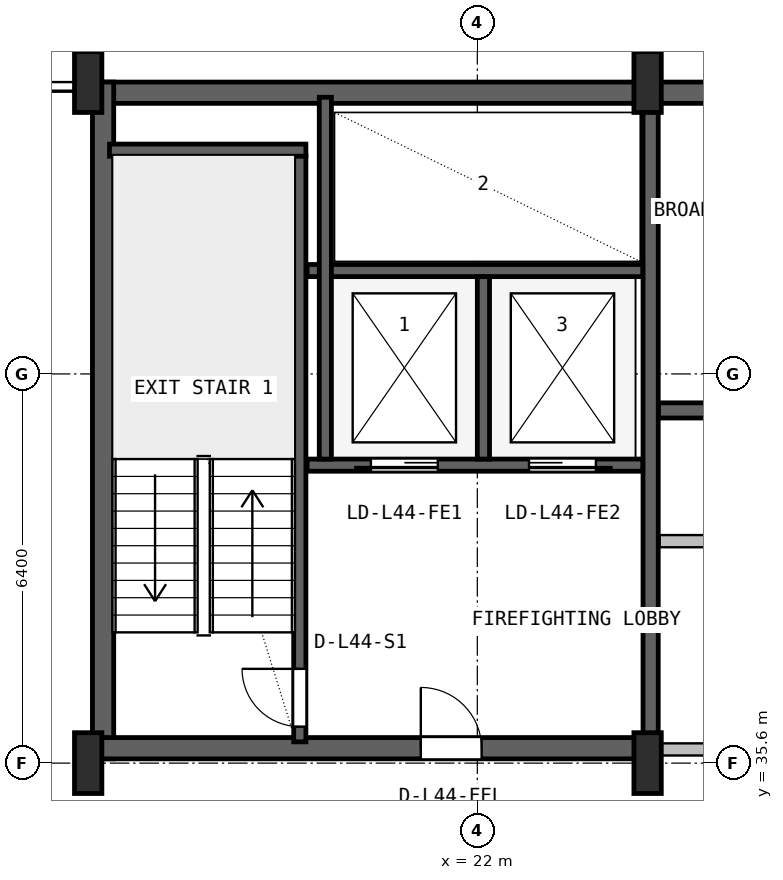
"""IFC4 building model, lengths in metres.
Left out: names, types, materials, properties, quantities, classifications, styles, units other than length and angle.
Written with IfcOpenShell. Run it as: python <this file> out.ifc"""

import sys

from ifc_helpers import new_model, si_unit, direction, frame, frame_2d, origin, origin_2d, place, context, subcontext, project, spatial, rectangle, i_section, extrude, source, transform, mapped, element, fill, save


model = new_model("IFC4")
c1 = context("Model", 3, precision=1e-05, world=origin(), true_north=direction((0.0, 1.0)))
c2 = subcontext(c1, "Body", "Model", "MODEL_VIEW")
j1 = project(units=[si_unit("LENGTHUNIT", "METRE"), si_unit("PLANEANGLEUNIT", "RADIAN")], contexts=[c1])
p1 = place(None, origin())
s1 = spatial("IfcSite", under=j1, at=p1, CompositionType="ELEMENT")
p2 = place(p1, origin())
s2 = spatial("IfcBuilding", under=s1, at=p2, CompositionType="ELEMENT")
p3 = place(p2, frame((0.0, 0.0, 180.0)))
s3 = spatial("IfcBuildingStorey", under=s2, at=p3, CompositionType="ELEMENT", Elevation=180.0)
p4 = place(p3, frame((15.6, 46.625, 0.0), z_axis=(0.0, 0.0, 1.0), x_axis=(1.0, 0.0, 0.0)))
e1 = element("IfcWall", 1, at=p4, inside=s3, PredefinedType="SHEAR", context=c2, shape_type="SweptSolid", body=[
    extrude(rectangle(XDim=36.8, YDim=0.35, at=frame_2d((18.4, 0.0))), origin(), (0.0, 0.0, 1.0), 3.55),
])
p5 = place(p3, frame((15.845, 35.67, 0.0), z_axis=(0.0, 0.0, 1.0), x_axis=(0.0, 1.0, 0.0)))
e2 = element("IfcWall", 2, at=p5, inside=s3, PredefinedType="SHEAR", context=c2, shape_type="SweptSolid", body=[
    extrude(rectangle(XDim=11.13, YDim=0.35, at=frame_2d((5.565, 0.0))), origin(), (0.0, 0.0, 1.0), 3.55),
])
p6 = place(p3, frame((15.67, 35.845, 0.0), z_axis=(0.0, 0.0, 1.0), x_axis=(1.0, 0.0, 0.0)))
e3 = element("IfcWall", 3, at=p6, inside=s3, PredefinedType="SHEAR", context=c2, shape_type="SweptSolid", body=[
    extrude(rectangle(XDim=9.13, YDim=0.35, at=frame_2d((4.565, 0.0))), origin(), (0.0, 0.0, 1.0), 3.55),
])
p7 = place(p6, frame((5.4, 0.0, 0.0)))
e4 = element("IfcOpeningElement", 4, at=p7, cuts=e3, PredefinedType="OPENING", context=c2, shape_type="SweptSolid", body=[
    extrude(rectangle(XDim=1.0, YDim=2.1, at=frame_2d((0.5, 1.05))), frame((0.0, 0.185, 0.0), z_axis=(0.0, -1.0, 0.0), x_axis=(1.0, 0.0, 0.0)), (0.0, 0.0, 1.0), 0.37),
])
m1 = source(origin(), c2, "Body", "SweptSolid", [
    extrude(i_section(OverallWidth=0.45, OverallDepth=1.0, WebThickness=0.016, FlangeThickness=0.03, FilletRadius=0.016, at=origin_2d()), origin(), (0.0, 0.0, 1.0), 3.8),
])
for number, where, z_axis, x_axis in (
    (5, (15.6, 35.6, 0.0), (0.0, 0.0, 1.0), (1.0, 0.0, 0.0)),
    (6, (15.6, 46.8, 0.0), (0.0, 0.0, 1.0), (1.0, 0.0, 0.0)),
    (7, (24.8, 35.6, 0.0), (0.0, 0.0, 1.0), (1.0, 0.0, 0.0)),
    (8, (24.8, 46.8, 0.0), (0.0, 0.0, 1.0), (1.0, 0.0, 0.0)),
):
    element("IfcColumn", number, at=place(p3, frame(where, z_axis=z_axis, x_axis=x_axis)), inside=s3, PredefinedType="COLUMN", context=c2, shape_type="MappedRepresentation", body=[
        mapped(m1, transform((0.0, 0.0, 0.0), x_axis=(1.0, 0.0, 0.0), y_axis=(0.0, 1.0, 0.0), z_axis=(0.0, 0.0, 1.0), scale=1.0)),
    ])
p8 = place(p3, frame((19.08, 35.95, 0.0), z_axis=(0.0, 0.0, 1.0), x_axis=(0.0, 1.0, 0.0)))
e9 = element("IfcWall", 9, at=p8, inside=s3, PredefinedType="SHEAR", context=c2, shape_type="SweptSolid", body=[
    extrude(rectangle(XDim=9.65, YDim=0.2, at=frame_2d((4.825, 0.0))), origin(), (0.0, 0.0, 1.0), 3.55),
])
p9 = place(p8, frame((0.25, 0.0, 0.0)))
e10 = element("IfcOpeningElement", 10, at=p9, cuts=e9, PredefinedType="OPENING", context=c2, shape_type="SweptSolid", body=[
    extrude(rectangle(XDim=0.95, YDim=2.1, at=frame_2d((0.475, 1.05))), frame((0.0, 0.11, 0.0), z_axis=(0.0, -1.0, 0.0), x_axis=(1.0, 0.0, 0.0)), (0.0, 0.0, 1.0), 0.22),
])
p10 = place(p3, frame((15.95, 45.68, 0.0), z_axis=(0.0, 0.0, 1.0), x_axis=(1.0, 0.0, 0.0)))
e11 = element("IfcWall", 11, at=p10, inside=s3, PredefinedType="SHEAR", context=c2, shape_type="SweptSolid", body=[
    extrude(rectangle(XDim=3.23, YDim=0.2, at=frame_2d((1.615, 0.0))), origin(), (0.0, 0.0, 1.0), 3.55),
])
p11 = place(p3, frame((24.85, 36.05, 0.0), z_axis=(0.0, 0.0, 1.0), x_axis=(0.0, 1.0, 0.0)))
e12 = element("IfcWall", 12, at=p11, inside=s3, PredefinedType="SHEAR", context=c2, shape_type="SweptSolid", body=[
    extrude(rectangle(XDim=10.45, YDim=0.25, at=frame_2d((5.225, 0.0))), origin(), (0.0, 0.0, 1.0), 3.55),
])
p12 = place(p3, frame((19.2, 40.5, 0.0), z_axis=(0.0, 0.0, 1.0), x_axis=(1.0, 0.0, 0.0)))
e13 = element("IfcWall", 13, at=p12, inside=s3, PredefinedType="SHEAR", context=c2, shape_type="SweptSolid", body=[
    extrude(rectangle(XDim=5.52, YDim=0.2, at=frame_2d((2.76, 0.0))), origin(), (0.0, 0.0, 1.0), 3.55),
])
p13 = place(p12, frame((1.05, 0.0, 0.0)))
e14 = element("IfcOpeningElement", 14, at=p13, cuts=e13, PredefinedType="OPENING", context=c2, shape_type="SweptSolid", body=[
    extrude(rectangle(XDim=1.1, YDim=2.18, at=frame_2d((0.55, 1.09))), frame((0.0, 0.11, 0.0), z_axis=(0.0, -1.0, 0.0), x_axis=(1.0, 0.0, 0.0)), (0.0, 0.0, 1.0), 0.22),
])
p14 = place(p12, frame((3.65, 0.0, 0.0)))
e15 = element("IfcOpeningElement", 15, at=p14, cuts=e13, PredefinedType="OPENING", context=c2, shape_type="SweptSolid", body=[
    extrude(rectangle(XDim=1.1, YDim=2.18, at=frame_2d((0.55, 1.09))), frame((0.0, 0.11, 0.0), z_axis=(0.0, -1.0, 0.0), x_axis=(1.0, 0.0, 0.0)), (0.0, 0.0, 1.0), 0.22),
])
p15 = place(p3, frame((19.2, 43.7, 0.0), z_axis=(0.0, 0.0, 1.0), x_axis=(1.0, 0.0, 0.0)))
e16 = element("IfcWall", 16, at=p15, inside=s3, PredefinedType="SHEAR", context=c2, shape_type="SweptSolid", body=[
    extrude(rectangle(XDim=5.52, YDim=0.2, at=frame_2d((2.76, 0.0))), origin(), (0.0, 0.0, 1.0), 3.55),
])
p16 = place(p3, frame((22.1, 40.6, 0.0), z_axis=(0.0, 0.0, 1.0), x_axis=(0.0, 1.0, 0.0)))
e17 = element("IfcWall", 17, at=p16, inside=s3, PredefinedType="SHEAR", context=c2, shape_type="SweptSolid", body=[
    extrude(rectangle(XDim=3.0, YDim=0.2, at=frame_2d((1.5, 0.0))), origin(), (0.0, 0.0, 1.0), 3.55),
])
p17 = place(p3, frame((19.5, 40.6, 0.0), z_axis=(0.0, 0.0, 1.0), x_axis=(0.0, 1.0, 0.0)))
e18 = element("IfcWall", 18, at=p17, inside=s3, PredefinedType="SHEAR", context=c2, shape_type="SweptSolid", body=[
    extrude(rectangle(XDim=5.95, YDim=0.2, at=frame_2d((2.975, 0.0))), origin(), (0.0, 0.0, 1.0), 3.55),
])
p18 = place(p3, frame((24.98, 41.4, 0.0), z_axis=(0.0, 0.0, 1.0), x_axis=(1.0, 0.0, 0.0)))
e19 = element("IfcWall", 19, at=p18, inside=s3, PredefinedType="SHEAR", context=c2, shape_type="SweptSolid", body=[
    extrude(rectangle(XDim=23.82, YDim=0.25, at=frame_2d((11.91, 0.0))), origin(), (0.0, 0.0, 1.0), 3.55),
])
p19 = place(p18, frame((8.87, 0.0, 0.0)))
e20 = element("IfcOpeningElement", 20, at=p19, cuts=e19, PredefinedType="OPENING", context=c2, shape_type="SweptSolid", body=[
    extrude(rectangle(XDim=1.1, YDim=2.18, at=frame_2d((0.55, 1.09))), frame((0.0, 0.135, 0.0), z_axis=(0.0, -1.0, 0.0), x_axis=(1.0, 0.0, 0.0)), (0.0, 0.0, 1.0), 0.27),
])
p20 = place(p18, frame((11.47, 0.0, 0.0)))
e21 = element("IfcOpeningElement", 21, at=p20, cuts=e19, PredefinedType="OPENING", context=c2, shape_type="SweptSolid", body=[
    extrude(rectangle(XDim=1.1, YDim=2.18, at=frame_2d((0.55, 1.09))), frame((0.0, 0.135, 0.0), z_axis=(0.0, -1.0, 0.0), x_axis=(1.0, 0.0, 0.0)), (0.0, 0.0, 1.0), 0.27),
])
p21 = place(p18, frame((14.07, 0.0, 0.0)))
e22 = element("IfcOpeningElement", 22, at=p21, cuts=e19, PredefinedType="OPENING", context=c2, shape_type="SweptSolid", body=[
    extrude(rectangle(XDim=1.1, YDim=2.18, at=frame_2d((0.55, 1.09))), frame((0.0, 0.135, 0.0), z_axis=(0.0, -1.0, 0.0), x_axis=(1.0, 0.0, 0.0)), (0.0, 0.0, 1.0), 0.27),
])
p22 = place(p18, frame((3.56, 0.0, 0.0)))
e23 = element("IfcOpeningElement", 23, at=p22, cuts=e19, PredefinedType="OPENING", context=c2, shape_type="SweptSolid", body=[
    extrude(rectangle(XDim=1.0, YDim=2.08, at=frame_2d((0.5, 1.04))), frame((0.0, 0.135, 0.0), z_axis=(0.0, -1.0, 0.0), x_axis=(1.0, 0.0, 0.0)), (0.0, 0.0, 1.0), 0.27),
])
p23 = place(p3, frame((25.0, 35.825, 0.0), z_axis=(0.0, 0.0, 1.0), x_axis=(1.0, 0.0, 0.0)))
e24 = element("IfcWall", 24, at=p23, inside=s3, PredefinedType="PLUMBINGWALL", context=c2, shape_type="SweptSolid", body=[
    extrude(rectangle(XDim=9.75, YDim=0.2, at=frame_2d((4.875, 0.0))), origin(), (0.0, 0.0, 1.0), 2.575),
])
p24 = place(p3, frame((25.0, 39.25, 0.0), z_axis=(0.0, 0.0, 1.0), x_axis=(1.0, 0.0, 0.0)))
e25 = element("IfcWall", 25, at=p24, inside=s3, PredefinedType="PLUMBINGWALL", context=c2, shape_type="SweptSolid", body=[
    extrude(rectangle(XDim=9.75, YDim=0.2, at=frame_2d((4.875, 0.0))), origin(), (0.0, 0.0, 1.0), 3.53),
])
p25 = place(p24, frame((1.75, 0.0, 0.0)))
e26 = element("IfcOpeningElement", 26, at=p25, cuts=e25, PredefinedType="OPENING", context=c2, shape_type="SweptSolid", body=[
    extrude(rectangle(XDim=0.9, YDim=2.06, at=frame_2d((0.45, 1.03))), frame((0.0, 0.11, 0.0), z_axis=(0.0, -1.0, 0.0), x_axis=(1.0, 0.0, 0.0)), (0.0, 0.0, 1.0), 0.22),
])
p26 = place(p24, frame((6.725, 0.0, 0.0)))
e27 = element("IfcOpeningElement", 27, at=p26, cuts=e25, PredefinedType="OPENING", context=c2, shape_type="SweptSolid", body=[
    extrude(rectangle(XDim=0.9, YDim=2.06, at=frame_2d((0.45, 1.03))), frame((0.0, 0.11, 0.0), z_axis=(0.0, -1.0, 0.0), x_axis=(1.0, 0.0, 0.0)), (0.0, 0.0, 1.0), 0.22),
])
m2 = source(origin(), c2, "Body", "SweptSolid", [
    extrude(rectangle(XDim=0.95, YDim=2.1, at=frame_2d((0.475, 1.05))), frame((0.0, 0.025, 0.0), z_axis=(0.0, -1.0, 0.0), x_axis=(1.0, 0.0, 0.0)), (0.0, 0.0, 1.0), 0.05),
])
p27 = place(p9, origin())
e28 = element("IfcDoor", 28, at=p27, inside=s3, OperationType="SINGLE_SWING_RIGHT", PredefinedType="DOOR", context=c2, shape_type="MappedRepresentation", body=[
    mapped(m2, transform((0.0, 0.0, 0.0), x_axis=(1.0, 0.0, 0.0), y_axis=(0.0, 1.0, 0.0), z_axis=(0.0, 0.0, 1.0), scale=1.0)),
])
fill(e10, e28)
m3 = source(origin(), c2, "Body", "SweptSolid", [
    extrude(rectangle(XDim=1.0, YDim=2.1, at=frame_2d((0.5, 1.05))), frame((0.0, 0.025, 0.0), z_axis=(0.0, -1.0, 0.0), x_axis=(1.0, 0.0, 0.0)), (0.0, 0.0, 1.0), 0.05),
])
p28 = place(p7, origin())
e29 = element("IfcDoor", 29, at=p28, inside=s3, OperationType="SINGLE_SWING_LEFT", PredefinedType="DOOR", context=c2, shape_type="MappedRepresentation", body=[
    mapped(m3, transform((0.0, 0.0, 0.0), x_axis=(1.0, 0.0, 0.0), y_axis=(0.0, 1.0, 0.0), z_axis=(0.0, 0.0, 1.0), scale=1.0)),
])
fill(e4, e29)
m4 = source(origin(), c2, "Body", "SweptSolid", [
    extrude(rectangle(XDim=1.1, YDim=2.18, at=frame_2d((0.55, 1.09))), frame((0.0, 0.025, 0.0), z_axis=(0.0, -1.0, 0.0), x_axis=(1.0, 0.0, 0.0)), (0.0, 0.0, 1.0), 0.05),
])
p29 = place(p13, frame((1.1, 0.0, 0.0), z_axis=(0.0, 0.0, 1.0), x_axis=(-1.0, 0.0, 0.0)))
e30 = element("IfcDoor", 30, at=p29, inside=s3, OperationType="SLIDING_TO_LEFT", PredefinedType="DOOR", context=c2, shape_type="MappedRepresentation", body=[
    mapped(m4, transform((0.0, 0.0, 0.0), x_axis=(1.0, 0.0, 0.0), y_axis=(0.0, 1.0, 0.0), z_axis=(0.0, 0.0, 1.0), scale=1.0)),
])
fill(e14, e30)
p30 = place(p14, frame((1.1, 0.0, 0.0), z_axis=(0.0, 0.0, 1.0), x_axis=(-1.0, 0.0, 0.0)))
e31 = element("IfcDoor", 31, at=p30, inside=s3, OperationType="SLIDING_TO_RIGHT", PredefinedType="DOOR", context=c2, shape_type="MappedRepresentation", body=[
    mapped(m4, transform((0.0, 0.0, 0.0), x_axis=(1.0, 0.0, 0.0), y_axis=(0.0, 1.0, 0.0), z_axis=(0.0, 0.0, 1.0), scale=1.0)),
])
fill(e15, e31)
save(model, sys.argv[1])
